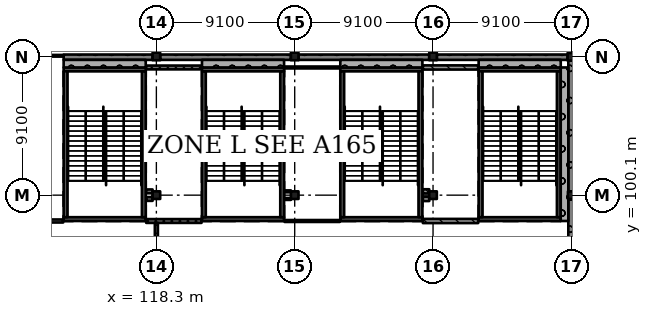
"""IFC4 building model, lengths in metres.
Left out: names, types, materials, properties, quantities, classifications, styles, units other than length and angle.
Written with IfcOpenShell. Run it as: python <this file> out.ifc"""

import sys

from ifc_helpers import new_model, si_unit, direction, frame, frame_2d, origin, origin_2d, place, context, subcontext, project, spatial, rectangle, extrude, element, fill, save


model = new_model("IFC4")
c1 = context("Model", 3, precision=1e-05, world=origin(), true_north=direction((0.0, 1.0)))
c2 = subcontext(c1, "Body", "Model", "MODEL_VIEW")
j1 = project(units=[si_unit("LENGTHUNIT", "METRE"), si_unit("PLANEANGLEUNIT", "RADIAN")], contexts=[c1])
p1 = place(None, origin())
s1 = spatial("IfcSite", under=j1, at=p1, CompositionType="ELEMENT")
p2 = place(p1, origin())
s2 = spatial("IfcBuilding", under=s1, at=p2, CompositionType="ELEMENT")
p3 = place(p2, frame((0.0, 0.0, 20.02)))
s3 = spatial("IfcBuildingStorey", under=s2, at=p3, CompositionType="ELEMENT", Elevation=20.02)
for number, where, z_axis, x_axis in (
    (1, (118.3, 100.1, 0.0), (0.0, 0.0, 1.0), (1.0, 0.0, 0.0)),
    (2, (118.3, 109.225, 0.0), (0.0, 0.0, 1.0), (1.0, 0.0, 0.0)),
    (3, (127.4, 100.1, 0.0), (0.0, 0.0, 1.0), (1.0, 0.0, 0.0)),
    (4, (127.4, 109.225, 0.0), (0.0, 0.0, 1.0), (1.0, 0.0, 0.0)),
    (5, (136.5, 100.1, 0.0), (0.0, 0.0, 1.0), (1.0, 0.0, 0.0)),
    (6, (136.5, 109.225, 0.0), (0.0, 0.0, 1.0), (1.0, 0.0, 0.0)),
    (7, (145.625, 100.1, 0.0), (0.0, 0.0, 1.0), (1.0, 0.0, 0.0)),
    (8, (145.6, 109.2, 0.0), (0.0, 0.0, 1.0), (1.0, 0.0, 0.0)),
):
    element("IfcColumn", number, at=place(p3, frame(where, z_axis=z_axis, x_axis=x_axis)), inside=s3, PredefinedType="COLUMN", context=c2, shape_type="SweptSolid", body=[
        extrude(rectangle(XDim=0.5, YDim=0.5, at=origin_2d()), origin(), (0.0, 0.0, 1.0), 4.55),
    ])
p4 = place(p3, frame((144.9, 98.525, 0.0), z_axis=(0.0, 0.0, 1.0), x_axis=(-1.0, 0.0, 0.0)))
e9 = element("IfcWall", 9, at=p4, inside=s3, PredefinedType="SHEAR", context=c2, shape_type="SweptSolid", body=[
    extrude(rectangle(XDim=5.4, YDim=0.25, at=frame_2d((2.7, 0.0))), origin(), (0.0, 0.0, 1.0), 4.55),
])
p5 = place(p4, frame((1.5, 0.0, 0.0)))
e10 = element("IfcOpeningElement", 10, at=p5, cuts=e9, PredefinedType="OPENING", context=c2, shape_type="SweptSolid", body=[
    extrude(rectangle(XDim=2.4, YDim=2.1, at=frame_2d((1.2, 1.05))), frame((0.0, 0.135, 0.0), z_axis=(0.0, -1.0, 0.0), x_axis=(1.0, 0.0, 0.0)), (0.0, 0.0, 1.0), 0.27),
])
p6 = place(p3, frame((144.9, 108.375, 0.0), z_axis=(0.0, 0.0, 1.0), x_axis=(-1.0, 0.0, 0.0)))
e11 = element("IfcWall", 11, at=p6, inside=s3, PredefinedType="SHEAR", context=c2, shape_type="SweptSolid", body=[
    extrude(rectangle(XDim=5.4, YDim=0.25, at=frame_2d((2.7, 0.0))), origin(), (0.0, 0.0, 1.0), 4.55),
])
for number, where, z_axis, x_axis in (
    (12, (139.625, 108.25, 0.0), (0.0, 0.0, 1.0), (0.0, -1.0, 0.0)),
    (13, (144.775, 108.25, 0.0), (0.0, 0.0, 1.0), (0.0, -1.0, 0.0)),
):
    element("IfcWall", number, at=place(p3, frame(where, z_axis=z_axis, x_axis=x_axis)), inside=s3, PredefinedType="SHEAR", context=c2, shape_type="SweptSolid", body=[
        extrude(rectangle(XDim=9.6, YDim=0.25, at=frame_2d((4.8, 0.0))), origin(), (0.0, 0.0, 1.0), 4.55),
    ])
p7 = place(p3, frame((135.8, 98.525, 0.0), z_axis=(0.0, 0.0, 1.0), x_axis=(-1.0, 0.0, 0.0)))
e14 = element("IfcWall", 14, at=p7, inside=s3, PredefinedType="SHEAR", context=c2, shape_type="SweptSolid", body=[
    extrude(rectangle(XDim=5.4, YDim=0.25, at=frame_2d((2.7, 0.0))), origin(), (0.0, 0.0, 1.0), 4.55),
])
p8 = place(p7, frame((1.5, 0.0, 0.0)))
e15 = element("IfcOpeningElement", 15, at=p8, cuts=e14, PredefinedType="OPENING", context=c2, shape_type="SweptSolid", body=[
    extrude(rectangle(XDim=2.4, YDim=2.1, at=frame_2d((1.2, 1.05))), frame((0.0, 0.135, 0.0), z_axis=(0.0, -1.0, 0.0), x_axis=(1.0, 0.0, 0.0)), (0.0, 0.0, 1.0), 0.27),
])
p9 = place(p3, frame((135.8, 108.375, 0.0), z_axis=(0.0, 0.0, 1.0), x_axis=(-1.0, 0.0, 0.0)))
e16 = element("IfcWall", 16, at=p9, inside=s3, PredefinedType="SHEAR", context=c2, shape_type="SweptSolid", body=[
    extrude(rectangle(XDim=5.4, YDim=0.25, at=frame_2d((2.7, 0.0))), origin(), (0.0, 0.0, 1.0), 4.55),
])
for number, where, z_axis, x_axis in (
    (17, (130.525, 108.25, 0.0), (0.0, 0.0, 1.0), (0.0, -1.0, 0.0)),
    (18, (135.675, 108.25, 0.0), (0.0, 0.0, 1.0), (0.0, -1.0, 0.0)),
):
    element("IfcWall", number, at=place(p3, frame(where, z_axis=z_axis, x_axis=x_axis)), inside=s3, PredefinedType="SHEAR", context=c2, shape_type="SweptSolid", body=[
        extrude(rectangle(XDim=9.6, YDim=0.25, at=frame_2d((4.8, 0.0))), origin(), (0.0, 0.0, 1.0), 4.55),
    ])
p10 = place(p3, frame((126.7, 98.525, 0.0), z_axis=(0.0, 0.0, 1.0), x_axis=(-1.0, 0.0, 0.0)))
e19 = element("IfcWall", 19, at=p10, inside=s3, PredefinedType="SHEAR", context=c2, shape_type="SweptSolid", body=[
    extrude(rectangle(XDim=5.4, YDim=0.25, at=frame_2d((2.7, 0.0))), origin(), (0.0, 0.0, 1.0), 4.55),
])
p11 = place(p10, frame((1.5, 0.0, 0.0)))
e20 = element("IfcOpeningElement", 20, at=p11, cuts=e19, PredefinedType="OPENING", context=c2, shape_type="SweptSolid", body=[
    extrude(rectangle(XDim=2.4, YDim=2.1, at=frame_2d((1.2, 1.05))), frame((0.0, 0.135, 0.0), z_axis=(0.0, -1.0, 0.0), x_axis=(1.0, 0.0, 0.0)), (0.0, 0.0, 1.0), 0.27),
])
p12 = place(p3, frame((126.7, 108.375, 0.0), z_axis=(0.0, 0.0, 1.0), x_axis=(-1.0, 0.0, 0.0)))
e21 = element("IfcWall", 21, at=p12, inside=s3, PredefinedType="SHEAR", context=c2, shape_type="SweptSolid", body=[
    extrude(rectangle(XDim=5.4, YDim=0.25, at=frame_2d((2.7, 0.0))), origin(), (0.0, 0.0, 1.0), 4.55),
])
for number, where, z_axis, x_axis in (
    (22, (121.425, 108.25, 0.0), (0.0, 0.0, 1.0), (0.0, -1.0, 0.0)),
    (23, (126.575, 108.25, 0.0), (0.0, 0.0, 1.0), (0.0, -1.0, 0.0)),
):
    element("IfcWall", number, at=place(p3, frame(where, z_axis=z_axis, x_axis=x_axis)), inside=s3, PredefinedType="SHEAR", context=c2, shape_type="SweptSolid", body=[
        extrude(rectangle(XDim=9.6, YDim=0.25, at=frame_2d((4.8, 0.0))), origin(), (0.0, 0.0, 1.0), 4.55),
    ])
p13 = place(p3, frame((117.6, 98.525, 0.0), z_axis=(0.0, 0.0, 1.0), x_axis=(-1.0, 0.0, 0.0)))
e24 = element("IfcWall", 24, at=p13, inside=s3, PredefinedType="SHEAR", context=c2, shape_type="SweptSolid", body=[
    extrude(rectangle(XDim=5.4, YDim=0.25, at=frame_2d((2.7, 0.0))), origin(), (0.0, 0.0, 1.0), 4.55),
])
p14 = place(p13, frame((1.5, 0.0, 0.0)))
e25 = element("IfcOpeningElement", 25, at=p14, cuts=e24, PredefinedType="OPENING", context=c2, shape_type="SweptSolid", body=[
    extrude(rectangle(XDim=2.4, YDim=2.1, at=frame_2d((1.2, 1.05))), frame((0.0, 0.135, 0.0), z_axis=(0.0, -1.0, 0.0), x_axis=(1.0, 0.0, 0.0)), (0.0, 0.0, 1.0), 0.27),
])
p15 = place(p3, frame((117.6, 108.375, 0.0), z_axis=(0.0, 0.0, 1.0), x_axis=(-1.0, 0.0, 0.0)))
e26 = element("IfcWall", 26, at=p15, inside=s3, PredefinedType="SHEAR", context=c2, shape_type="SweptSolid", body=[
    extrude(rectangle(XDim=5.4, YDim=0.25, at=frame_2d((2.7, 0.0))), origin(), (0.0, 0.0, 1.0), 4.55),
])
for number, where, z_axis, x_axis in (
    (27, (112.325, 108.25, 0.0), (0.0, 0.0, 1.0), (0.0, -1.0, 0.0)),
    (28, (117.475, 108.25, 0.0), (0.0, 0.0, 1.0), (0.0, -1.0, 0.0)),
):
    element("IfcWall", number, at=place(p3, frame(where, z_axis=z_axis, x_axis=x_axis)), inside=s3, PredefinedType="SHEAR", context=c2, shape_type="SweptSolid", body=[
        extrude(rectangle(XDim=9.6, YDim=0.25, at=frame_2d((4.8, 0.0))), origin(), (0.0, 0.0, 1.0), 4.55),
    ])
p16 = place(p3, frame((145.575, 91.25, 0.0), z_axis=(0.0, 0.0, 1.0), x_axis=(0.0, 1.0, 0.0)))
e29 = element("IfcWall", 29, at=p16, inside=s3, PredefinedType="SOLIDWALL", context=c2, shape_type="SweptSolid", body=[
    extrude(rectangle(XDim=8.6, YDim=0.35, at=frame_2d((4.3, 0.0))), origin(), (0.0, 0.0, 1.0), 3.5),
])
p17 = place(p3, frame((145.575, 100.35, 0.0), z_axis=(0.0, 0.0, 1.0), x_axis=(0.0, 1.0, 0.0)))
e30 = element("IfcWall", 30, at=p17, inside=s3, PredefinedType="SOLIDWALL", context=c2, shape_type="SweptSolid", body=[
    extrude(rectangle(XDim=8.6, YDim=0.35, at=frame_2d((4.3, 0.0))), origin(), (0.0, 0.0, 1.0), 3.5),
])
for number, where, z_axis, x_axis in (
    (31, (145.35, 109.175, 0.0), (0.0, 0.0, 1.0), (-1.0, 0.0, 0.0)),
    (32, (136.25, 109.175, 0.0), (0.0, 0.0, 1.0), (-1.0, 0.0, 0.0)),
):
    element("IfcWall", number, at=place(p3, frame(where, z_axis=z_axis, x_axis=x_axis)), inside=s3, PredefinedType="SOLIDWALL", context=c2, shape_type="SweptSolid", body=[
        extrude(rectangle(XDim=8.6, YDim=0.35, at=frame_2d((4.3, 0.0))), origin(), (0.0, 0.0, 1.0), 3.5),
    ])
p18 = place(p3, frame((127.15, 109.175, 0.0), z_axis=(0.0, 0.0, 1.0), x_axis=(-1.0, 0.0, 0.0)))
e33 = element("IfcWall", 33, at=p18, inside=s3, PredefinedType="SOLIDWALL", context=c2, shape_type="SweptSolid", body=[
    extrude(rectangle(XDim=8.6, YDim=0.35, at=frame_2d((4.3, 0.0))), origin(), (0.0, 0.0, 1.0), 3.5),
])
p19 = place(p3, frame((118.05, 109.175, 0.0), z_axis=(0.0, 0.0, 1.0), x_axis=(-1.0, 0.0, 0.0)))
e34 = element("IfcWall", 34, at=p19, inside=s3, PredefinedType="SOLIDWALL", context=c2, shape_type="SweptSolid", body=[
    extrude(rectangle(XDim=5.85, YDim=0.35, at=frame_2d((2.925, 0.0))), origin(), (0.0, 0.0, 1.0), 3.5),
])
p20 = place(p3, frame((139.5, 108.75, 0.0), z_axis=(0.0, 0.0, 1.0), x_axis=(1.0, 0.0, 0.0)))
e35 = element("IfcWall", 35, at=p20, inside=s3, PredefinedType="SOLIDWALL", context=c2, shape_type="SweptSolid", body=[
    extrude(rectangle(XDim=5.4, YDim=0.5, at=frame_2d((2.7, 0.0))), origin(), (0.0, 0.0, 1.0), 4.25),
])
p21 = place(p3, frame((145.15, 98.4, 0.0), z_axis=(0.0, 0.0, 1.0), x_axis=(0.0, 1.0, 0.0)))
e36 = element("IfcWall", 36, at=p21, inside=s3, PredefinedType="SOLIDWALL", context=c2, shape_type="SweptSolid", body=[
    extrude(rectangle(XDim=10.1, YDim=0.5, at=frame_2d((5.05, 0.0))), origin(), (0.0, 0.0, 1.0), 4.55),
])
p22 = place(p3, frame((130.4, 108.75, 0.0), z_axis=(0.0, 0.0, 1.0), x_axis=(1.0, 0.0, 0.0)))
e37 = element("IfcWall", 37, at=p22, inside=s3, PredefinedType="SOLIDWALL", context=c2, shape_type="SweptSolid", body=[
    extrude(rectangle(XDim=5.4, YDim=0.5, at=frame_2d((2.7, 0.0))), origin(), (0.0, 0.0, 1.0), 4.25),
])
p23 = place(p3, frame((121.3, 108.75, 0.0), z_axis=(0.0, 0.0, 1.0), x_axis=(1.0, 0.0, 0.0)))
e38 = element("IfcWall", 38, at=p23, inside=s3, PredefinedType="SOLIDWALL", context=c2, shape_type="SweptSolid", body=[
    extrude(rectangle(XDim=5.4, YDim=0.5, at=frame_2d((2.7, 0.0))), origin(), (0.0, 0.0, 1.0), 4.25),
])
p24 = place(p3, frame((112.2, 108.75, 0.0), z_axis=(0.0, 0.0, 1.0), x_axis=(1.0, 0.0, 0.0)))
e39 = element("IfcWall", 39, at=p24, inside=s3, PredefinedType="SOLIDWALL", context=c2, shape_type="SweptSolid", body=[
    extrude(rectangle(XDim=5.4, YDim=0.5, at=frame_2d((2.7, 0.0))), origin(), (0.0, 0.0, 1.0), 4.25),
])
p25 = place(p3, frame((109.4, 98.4, 0.0), z_axis=(0.0, 0.0, 1.0), x_axis=(1.0, 0.0, 0.0)))
e40 = element("IfcWall", 40, at=p25, inside=s3, PredefinedType="PARTITIONING", context=c2, shape_type="SweptSolid", body=[
    extrude(rectangle(XDim=2.77, YDim=0.2, at=frame_2d((1.385, 0.0))), origin(), (0.0, 0.0, 1.0), 4.25),
])
p26 = place(p25, frame((0.45, 0.0, 0.0)))
e41 = element("IfcOpeningElement", 41, at=p26, cuts=e40, PredefinedType="OPENING", context=c2, shape_type="SweptSolid", body=[
    extrude(rectangle(XDim=1.8, YDim=2.4, at=frame_2d((0.9, 1.2))), frame((0.0, 0.11, 0.0), z_axis=(0.0, -1.0, 0.0), x_axis=(1.0, 0.0, 0.0)), (0.0, 0.0, 1.0), 0.22),
])
p27 = place(p3, frame((117.63, 98.4, 0.0), z_axis=(0.0, 0.0, 1.0), x_axis=(1.0, 0.0, 0.0)))
e42 = element("IfcWall", 42, at=p27, inside=s3, PredefinedType="SOLIDWALL", context=c2, shape_type="SweptSolid", body=[
    extrude(rectangle(XDim=3.64, YDim=0.25, at=frame_2d((1.82, 0.0))), origin(), (0.0, 0.0, 1.0), 4.25),
])
p28 = place(p27, frame((1.62, 0.0, 0.0)))
e43 = element("IfcOpeningElement", 43, at=p28, cuts=e42, PredefinedType="OPENING", context=c2, shape_type="SweptSolid", body=[
    extrude(rectangle(XDim=1.0, YDim=2.1, at=frame_2d((0.5, 1.05))), frame((0.0, 0.135, 0.0), z_axis=(0.0, -1.0, 0.0), x_axis=(1.0, 0.0, 0.0)), (0.0, 0.0, 1.0), 0.27),
])
p29 = place(p3, frame((117.63, 99.85, 0.0), z_axis=(0.0, 0.0, 1.0), x_axis=(1.0, 0.0, 0.0)))
e44 = element("IfcWall", 44, at=p29, inside=s3, PredefinedType="SOLIDWALL", context=c2, shape_type="SweptSolid", body=[
    extrude(rectangle(XDim=0.42, YDim=0.25, at=frame_2d((0.21, 0.0))), origin(), (0.0, 0.0, 1.0), 4.25),
])
p30 = place(p3, frame((117.63, 108.5, 0.0), z_axis=(0.0, 0.0, 1.0), x_axis=(1.0, 0.0, 0.0)))
e45 = element("IfcWall", 45, at=p30, inside=s3, PredefinedType="SOLIDWALL", context=c2, shape_type="SweptSolid", body=[
    extrude(rectangle(XDim=3.64, YDim=0.25, at=frame_2d((1.82, 0.0))), origin(), (0.0, 0.0, 1.0), 4.25),
])
p31 = place(p3, frame((118.05, 100.35, 0.0), z_axis=(0.0, 0.0, 1.0), x_axis=(-1.0, 0.0, 0.0)))
e46 = element("IfcWall", 46, at=p31, inside=s3, PredefinedType="SOLIDWALL", context=c2, shape_type="SweptSolid", body=[
    extrude(rectangle(XDim=0.42, YDim=0.25, at=frame_2d((0.21, 0.0))), origin(), (0.0, 0.0, 1.0), 4.25),
])
p32 = place(p3, frame((118.3, 91.3, 0.0), z_axis=(0.0, 0.0, 1.0), x_axis=(0.0, 1.0, 0.0)))
e47 = element("IfcWall", 47, at=p32, inside=s3, PredefinedType="PARTITIONING", context=c2, shape_type="SweptSolid", body=[
    extrude(rectangle(XDim=6.975, YDim=0.2, at=frame_2d((3.487, 0.0))), origin(), (0.0, 0.0, 1.0), 3.5),
])
p33 = place(p32, frame((0.85, 0.0, 0.0)))
e48 = element("IfcOpeningElement", 48, at=p33, cuts=e47, PredefinedType="OPENING", context=c2, shape_type="SweptSolid", body=[
    extrude(rectangle(XDim=1.8, YDim=2.4, at=frame_2d((0.9, 1.2))), frame((0.0, 0.11, 0.0), z_axis=(0.0, -1.0, 0.0), x_axis=(1.0, 0.0, 0.0)), (0.0, 0.0, 1.0), 0.22),
])
p34 = place(p32, frame((4.35, 0.0, 0.0)))
e49 = element("IfcOpeningElement", 49, at=p34, cuts=e47, PredefinedType="OPENING", context=c2, shape_type="SweptSolid", body=[
    extrude(rectangle(XDim=1.8, YDim=2.4, at=frame_2d((0.9, 1.2))), frame((0.0, 0.11, 0.0), z_axis=(0.0, -1.0, 0.0), x_axis=(1.0, 0.0, 0.0)), (0.0, 0.0, 1.0), 0.22),
])
p35 = place(p3, frame((126.73, 98.4, 0.0), z_axis=(0.0, 0.0, 1.0), x_axis=(1.0, 0.0, 0.0)))
e50 = element("IfcWall", 50, at=p35, inside=s3, PredefinedType="PARTITIONING", context=c2, shape_type="SweptSolid", body=[
    extrude(rectangle(XDim=3.64, YDim=0.125, at=frame_2d((1.82, 0.0))), origin(), (0.0, 0.0, 1.0), 4.25),
])
p36 = place(p35, frame((1.35, 0.0, 0.0)))
e51 = element("IfcOpeningElement", 51, at=p36, cuts=e50, PredefinedType="OPENING", context=c2, shape_type="SweptSolid", body=[
    extrude(rectangle(XDim=0.9, YDim=2.1, at=frame_2d((0.45, 1.05))), frame((0.0, 0.073, 0.0), z_axis=(0.0, -1.0, 0.0), x_axis=(1.0, 0.0, 0.0)), (0.0, 0.0, 1.0), 0.145),
])
p37 = place(p3, frame((126.73, 99.85, 0.0), z_axis=(0.0, 0.0, 1.0), x_axis=(1.0, 0.0, 0.0)))
e52 = element("IfcWall", 52, at=p37, inside=s3, PredefinedType="PARTITIONING", context=c2, shape_type="SweptSolid", body=[
    extrude(rectangle(XDim=0.42, YDim=0.125, at=frame_2d((0.21, 0.0))), origin(), (0.0, 0.0, 1.0), 4.25),
])
p38 = place(p3, frame((126.73, 108.5, 0.0), z_axis=(0.0, 0.0, 1.0), x_axis=(1.0, 0.0, 0.0)))
e53 = element("IfcWall", 53, at=p38, inside=s3, PredefinedType="PARTITIONING", context=c2, shape_type="SweptSolid", body=[
    extrude(rectangle(XDim=3.64, YDim=0.125, at=frame_2d((1.82, 0.0))), origin(), (0.0, 0.0, 1.0), 4.25),
])
p39 = place(p3, frame((127.15, 100.35, 0.0), z_axis=(0.0, 0.0, 1.0), x_axis=(-1.0, 0.0, 0.0)))
e54 = element("IfcWall", 54, at=p39, inside=s3, PredefinedType="PARTITIONING", context=c2, shape_type="SweptSolid", body=[
    extrude(rectangle(XDim=0.42, YDim=0.125, at=frame_2d((0.21, 0.0))), origin(), (0.0, 0.0, 1.0), 4.25),
])
p40 = place(p3, frame((135.83, 98.4, 0.0), z_axis=(0.0, 0.0, 1.0), x_axis=(1.0, 0.0, 0.0)))
e55 = element("IfcWall", 55, at=p40, inside=s3, PredefinedType="SOLIDWALL", context=c2, shape_type="SweptSolid", body=[
    extrude(rectangle(XDim=3.64, YDim=0.275, at=frame_2d((1.82, 0.0))), origin(), (0.0, 0.0, 1.0), 4.25),
])
p41 = place(p40, frame((1.25, 0.0, 0.0)))
e56 = element("IfcOpeningElement", 56, at=p41, cuts=e55, PredefinedType="OPENING", context=c2, shape_type="SweptSolid", body=[
    extrude(rectangle(XDim=1.2, YDim=2.4, at=frame_2d((0.6, 1.2))), frame((0.0, 0.147, 0.0), z_axis=(0.0, -1.0, 0.0), x_axis=(1.0, 0.0, 0.0)), (0.0, 0.0, 1.0), 0.295),
])
p42 = place(p3, frame((135.83, 99.85, 0.0), z_axis=(0.0, 0.0, 1.0), x_axis=(1.0, 0.0, 0.0)))
e57 = element("IfcWall", 57, at=p42, inside=s3, PredefinedType="SOLIDWALL", context=c2, shape_type="SweptSolid", body=[
    extrude(rectangle(XDim=0.42, YDim=0.275, at=frame_2d((0.21, 0.0))), origin(), (0.0, 0.0, 1.0), 4.25),
])
p43 = place(p3, frame((135.83, 108.5, 0.0), z_axis=(0.0, 0.0, 1.0), x_axis=(1.0, 0.0, 0.0)))
e58 = element("IfcWall", 58, at=p43, inside=s3, PredefinedType="SOLIDWALL", context=c2, shape_type="SweptSolid", body=[
    extrude(rectangle(XDim=3.64, YDim=0.275, at=frame_2d((1.82, 0.0))), origin(), (0.0, 0.0, 1.0), 4.25),
])
p44 = place(p3, frame((136.25, 100.35, 0.0), z_axis=(0.0, 0.0, 1.0), x_axis=(-1.0, 0.0, 0.0)))
e59 = element("IfcWall", 59, at=p44, inside=s3, PredefinedType="SOLIDWALL", context=c2, shape_type="SweptSolid", body=[
    extrude(rectangle(XDim=0.42, YDim=0.275, at=frame_2d((0.21, 0.0))), origin(), (0.0, 0.0, 1.0), 4.25),
])
p45 = place(p41, origin())
e60 = element("IfcDoor", 60, at=p45, inside=s3, OperationType="SINGLE_SWING_LEFT", PredefinedType="DOOR", context=c2, shape_type="SweptSolid", body=[
    extrude(rectangle(XDim=1.2, YDim=2.4, at=frame_2d((0.6, 1.2))), frame((0.0, 0.025, 0.0), z_axis=(0.0, -1.0, 0.0), x_axis=(1.0, 0.0, 0.0)), (0.0, 0.0, 1.0), 0.05),
])
fill(e56, e60)
p46 = place(p36, origin())
e61 = element("IfcDoor", 61, at=p46, inside=s3, OperationType="SINGLE_SWING_RIGHT", PredefinedType="DOOR", context=c2, shape_type="SweptSolid", body=[
    extrude(rectangle(XDim=0.9, YDim=2.1, at=frame_2d((0.45, 1.05))), frame((0.0, 0.025, 0.0), z_axis=(0.0, -1.0, 0.0), x_axis=(1.0, 0.0, 0.0)), (0.0, 0.0, 1.0), 0.05),
])
fill(e51, e61)
p47 = place(p28, origin())
e62 = element("IfcDoor", 62, at=p47, inside=s3, OperationType="SINGLE_SWING_RIGHT", PredefinedType="DOOR", context=c2, shape_type="SweptSolid", body=[
    extrude(rectangle(XDim=1.0, YDim=2.1, at=frame_2d((0.5, 1.05))), frame((0.0, 0.025, 0.0), z_axis=(0.0, -1.0, 0.0), x_axis=(1.0, 0.0, 0.0)), (0.0, 0.0, 1.0), 0.05),
])
fill(e43, e62)
p48 = place(p34, origin())
e63 = element("IfcDoor", 63, at=p48, inside=s3, OperationType="DOUBLE_DOOR_SINGLE_SWING", PredefinedType="DOOR", context=c2, shape_type="SweptSolid", body=[
    extrude(rectangle(XDim=1.8, YDim=2.4, at=frame_2d((0.9, 1.2))), frame((0.0, 0.025, 0.0), z_axis=(0.0, -1.0, 0.0), x_axis=(1.0, 0.0, 0.0)), (0.0, 0.0, 1.0), 0.05),
])
fill(e49, e63)
p49 = place(p26, origin())
e64 = element("IfcDoor", 64, at=p49, inside=s3, OperationType="DOUBLE_DOOR_SINGLE_SWING", PredefinedType="DOOR", context=c2, shape_type="SweptSolid", body=[
    extrude(rectangle(XDim=1.8, YDim=2.4, at=frame_2d((0.9, 1.2))), frame((0.0, 0.025, 0.0), z_axis=(0.0, -1.0, 0.0), x_axis=(1.0, 0.0, 0.0)), (0.0, 0.0, 1.0), 0.05),
])
fill(e41, e64)
p50 = place(p5, origin())
e65 = element("IfcDoor", 65, at=p50, inside=s3, OperationType="DOUBLE_DOOR_SINGLE_SWING", PredefinedType="DOOR", context=c2, shape_type="SweptSolid", body=[
    extrude(rectangle(XDim=2.4, YDim=2.1, at=frame_2d((1.2, 1.05))), frame((0.0, 0.025, 0.0), z_axis=(0.0, -1.0, 0.0), x_axis=(1.0, 0.0, 0.0)), (0.0, 0.0, 1.0), 0.05),
])
fill(e10, e65)
p51 = place(p8, origin())
e66 = element("IfcDoor", 66, at=p51, inside=s3, OperationType="DOUBLE_DOOR_SINGLE_SWING", PredefinedType="DOOR", context=c2, shape_type="SweptSolid", body=[
    extrude(rectangle(XDim=2.4, YDim=2.1, at=frame_2d((1.2, 1.05))), frame((0.0, 0.025, 0.0), z_axis=(0.0, -1.0, 0.0), x_axis=(1.0, 0.0, 0.0)), (0.0, 0.0, 1.0), 0.05),
])
fill(e15, e66)
p52 = place(p11, origin())
e67 = element("IfcDoor", 67, at=p52, inside=s3, OperationType="DOUBLE_DOOR_SINGLE_SWING", PredefinedType="DOOR", context=c2, shape_type="SweptSolid", body=[
    extrude(rectangle(XDim=2.4, YDim=2.1, at=frame_2d((1.2, 1.05))), frame((0.0, 0.025, 0.0), z_axis=(0.0, -1.0, 0.0), x_axis=(1.0, 0.0, 0.0)), (0.0, 0.0, 1.0), 0.05),
])
fill(e20, e67)
p53 = place(p14, origin())
e68 = element("IfcDoor", 68, at=p53, inside=s3, OperationType="DOUBLE_DOOR_SINGLE_SWING", PredefinedType="DOOR", context=c2, shape_type="SweptSolid", body=[
    extrude(rectangle(XDim=2.4, YDim=2.1, at=frame_2d((1.2, 1.05))), frame((0.0, 0.025, 0.0), z_axis=(0.0, -1.0, 0.0), x_axis=(1.0, 0.0, 0.0)), (0.0, 0.0, 1.0), 0.05),
])
fill(e25, e68)
save(model, sys.argv[1])
